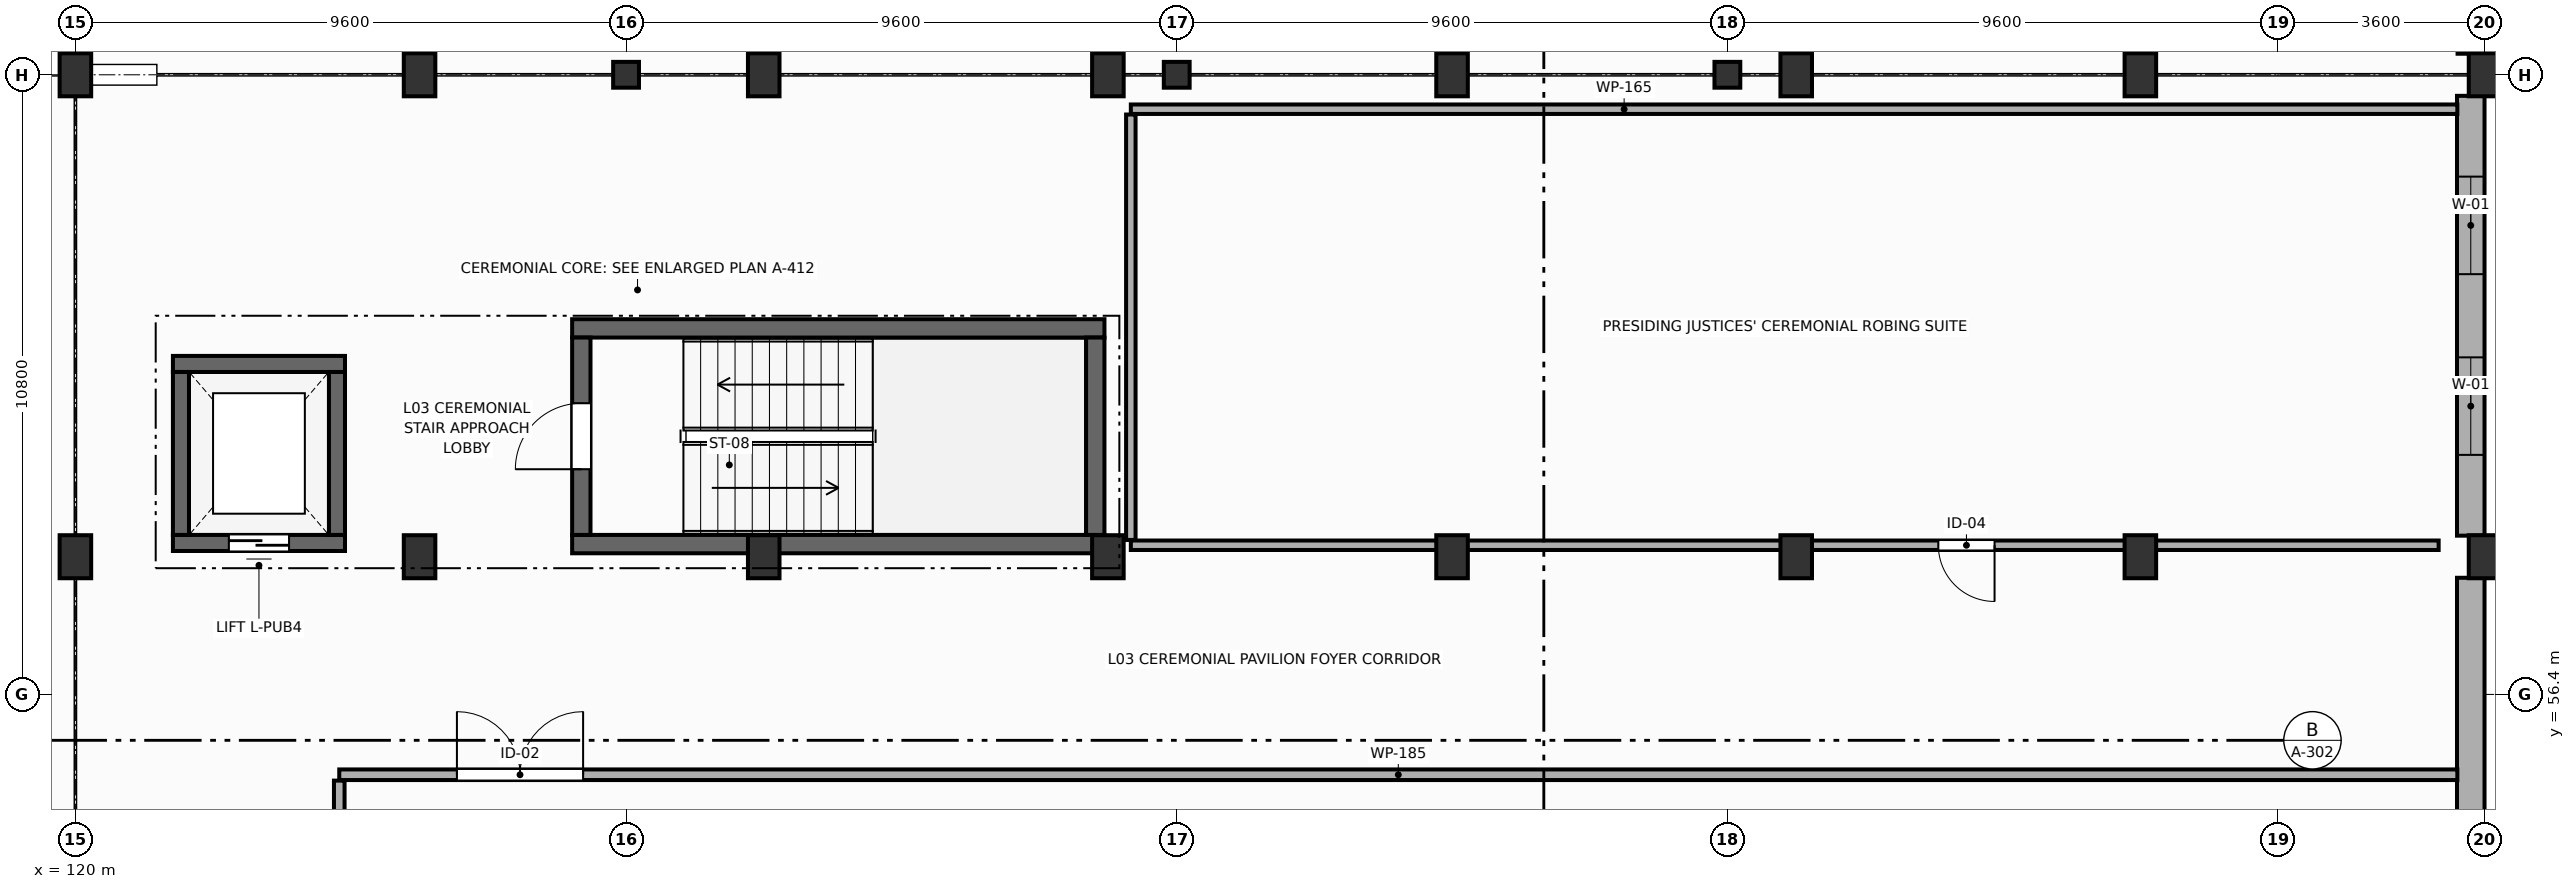
"""IFC4 building model, lengths in metres.
Left out: names, types, materials, properties, quantities, classifications, styles, units other than length and angle.
Written with IfcOpenShell. Run it as: python <this file> out.ifc"""

import sys

from ifc_helpers import new_model, si_unit, direction, frame, frame_2d, origin, origin_2d, place, context, subcontext, project, spatial, rectangle, extrude, element, fill, save


model = new_model("IFC4")
c1 = context("Model", 3, precision=1e-05, world=origin(), true_north=direction((0.0, 1.0)))
c2 = subcontext(c1, "Body", "Model", "MODEL_VIEW")
j1 = project(units=[si_unit("LENGTHUNIT", "METRE"), si_unit("PLANEANGLEUNIT", "RADIAN")], contexts=[c1])
p1 = place(None, origin())
s1 = spatial("IfcSite", under=j1, at=p1, CompositionType="ELEMENT")
p2 = place(p1, origin())
s2 = spatial("IfcBuilding", under=s1, at=p2, CompositionType="ELEMENT")
p3 = place(p2, frame((0.0, 0.0, 9.9)))
s3 = spatial("IfcBuildingStorey", under=s2, at=p3, CompositionType="ELEMENT", Elevation=9.9)
for number, where, z_axis, x_axis in (
    (1, (120.0, 58.8, 0.0), (0.0, 0.0, 1.0), (1.0, 0.0, 0.0)),
    (2, (120.0, 67.2, 0.0), (0.0, 0.0, 1.0), (1.0, 0.0, 0.0)),
    (3, (126.0, 58.8, 0.0), (0.0, 0.0, 1.0), (1.0, 0.0, 0.0)),
    (4, (126.0, 67.2, 0.0), (0.0, 0.0, 1.0), (1.0, 0.0, 0.0)),
    (5, (132.0, 58.8, 0.0), (0.0, 0.0, 1.0), (1.0, 0.0, 0.0)),
    (6, (132.0, 67.2, 0.0), (0.0, 0.0, 1.0), (1.0, 0.0, 0.0)),
    (7, (138.0, 58.8, 0.0), (0.0, 0.0, 1.0), (1.0, 0.0, 0.0)),
    (8, (138.0, 67.2, 0.0), (0.0, 0.0, 1.0), (1.0, 0.0, 0.0)),
    (9, (144.0, 58.8, 0.0), (0.0, 0.0, 1.0), (1.0, 0.0, 0.0)),
    (10, (144.0, 67.2, 0.0), (0.0, 0.0, 1.0), (1.0, 0.0, 0.0)),
    (11, (150.0, 58.8, 0.0), (0.0, 0.0, 1.0), (1.0, 0.0, 0.0)),
    (12, (150.0, 67.2, 0.0), (0.0, 0.0, 1.0), (1.0, 0.0, 0.0)),
    (13, (156.0, 58.8, 0.0), (0.0, 0.0, 1.0), (1.0, 0.0, 0.0)),
    (14, (156.0, 67.2, 0.0), (0.0, 0.0, 1.0), (1.0, 0.0, 0.0)),
    (15, (162.0, 58.8, 0.0), (0.0, 0.0, 1.0), (1.0, 0.0, 0.0)),
    (16, (162.0, 67.2, 0.0), (0.0, 0.0, 1.0), (1.0, 0.0, 0.0)),
):
    element("IfcColumn", number, at=place(p3, frame(where, z_axis=z_axis, x_axis=x_axis)), inside=s3, PredefinedType="COLUMN", context=c2, shape_type="SweptSolid", body=[
        extrude(rectangle(XDim=0.55, YDim=0.75, at=origin_2d()), origin(), (0.0, 0.0, 1.0), 4.5),
    ])
for number, where, z_axis, x_axis in (
    (17, (129.6, 67.2, 0.0), (0.0, 0.0, 1.0), (1.0, 0.0, 0.0)),
    (18, (139.2, 67.2, 0.0), (0.0, 0.0, 1.0), (1.0, 0.0, 0.0)),
    (19, (148.8, 67.2, 0.0), (0.0, 0.0, 1.0), (1.0, 0.0, 0.0)),
):
    element("IfcColumn", number, at=place(p3, frame(where, z_axis=z_axis, x_axis=x_axis)), inside=s3, PredefinedType="COLUMN", context=c2, shape_type="SweptSolid", body=[
        extrude(rectangle(XDim=0.45, YDim=0.45, at=origin_2d()), origin(), (0.0, 0.0, 1.0), 4.5),
    ])
p4 = place(p3, frame((161.76, 58.433, 0.0), z_axis=(0.0, 0.0, 1.0), x_axis=(0.0, -1.0, 0.0)))
e20 = element("IfcWall", 20, at=p4, inside=s3, PredefinedType="STANDARD", context=c2, shape_type="SweptSolid", body=[
    extrude(rectangle(XDim=20.866, YDim=0.48, at=frame_2d((10.433, 0.0))), origin(), (0.0, 0.0, 1.0), 4.24),
])
p5 = place(p4, frame((9.583, 0.0, 0.85)))
e21 = element("IfcOpeningElement", 21, at=p5, cuts=e20, PredefinedType="OPENING", context=c2, shape_type="SweptSolid", body=[
    extrude(rectangle(XDim=1.7, YDim=2.3, at=frame_2d((0.85, 1.15))), frame((0.0, 0.25, 0.0), z_axis=(0.0, -1.0, 0.0), x_axis=(1.0, 0.0, 0.0)), (0.0, 0.0, 1.0), 0.5),
])
p6 = place(p4, frame((16.083, 0.0, 0.85)))
e22 = element("IfcOpeningElement", 22, at=p6, cuts=e20, PredefinedType="OPENING", context=c2, shape_type="SweptSolid", body=[
    extrude(rectangle(XDim=1.7, YDim=2.3, at=frame_2d((0.85, 1.15))), frame((0.0, 0.25, 0.0), z_axis=(0.0, -1.0, 0.0), x_axis=(1.0, 0.0, 0.0)), (0.0, 0.0, 1.0), 0.5),
])
p7 = place(p3, frame((161.76, 66.833, 0.0), z_axis=(0.0, 0.0, 1.0), x_axis=(0.0, -1.0, 0.0)))
e23 = element("IfcWall", 23, at=p7, inside=s3, PredefinedType="STANDARD", context=c2, shape_type="SweptSolid", body=[
    extrude(rectangle(XDim=7.666, YDim=0.48, at=frame_2d((3.833, 0.0))), origin(), (0.0, 0.0, 1.0), 3.73),
])
p8 = place(p7, frame((1.408, 0.0, 0.85)))
e24 = element("IfcOpeningElement", 24, at=p8, cuts=e23, PredefinedType="OPENING", context=c2, shape_type="SweptSolid", body=[
    extrude(rectangle(XDim=1.7, YDim=2.3, at=frame_2d((0.85, 1.15))), frame((0.0, 0.25, 0.0), z_axis=(0.0, -1.0, 0.0), x_axis=(1.0, 0.0, 0.0)), (0.0, 0.0, 1.0), 0.5),
])
p9 = place(p7, frame((4.558, 0.0, 0.85)))
e25 = element("IfcOpeningElement", 25, at=p9, cuts=e23, PredefinedType="OPENING", context=c2, shape_type="SweptSolid", body=[
    extrude(rectangle(XDim=1.7, YDim=2.3, at=frame_2d((0.85, 1.15))), frame((0.0, 0.25, 0.0), z_axis=(0.0, -1.0, 0.0), x_axis=(1.0, 0.0, 0.0)), (0.0, 0.0, 1.0), 0.5),
])
p10 = place(p3, frame((161.76, 74.188, 0.0), z_axis=(0.0, 0.0, 1.0), x_axis=(0.0, -1.0, 0.0)))
e26 = element("IfcWall", 26, at=p10, inside=s3, PredefinedType="STANDARD", context=c2, shape_type="SweptSolid", body=[
    extrude(rectangle(XDim=6.621, YDim=0.46, at=frame_2d((3.311, 0.0))), origin(), (0.0, 0.0, 1.0), 3.38),
])
p11 = place(p10, frame((1.678, 0.0, 2.15)))
e27 = element("IfcOpeningElement", 27, at=p11, cuts=e26, PredefinedType="OPENING", context=c2, shape_type="SweptSolid", body=[
    extrude(rectangle(XDim=0.85, YDim=0.9, at=frame_2d((0.425, 0.45))), frame((0.0, 0.24, 0.0), z_axis=(0.0, -1.0, 0.0), x_axis=(1.0, 0.0, 0.0)), (0.0, 0.0, 1.0), 0.48),
])
p12 = place(p10, frame((4.248, 0.0, 2.15)))
e28 = element("IfcOpeningElement", 28, at=p12, cuts=e26, PredefinedType="OPENING", context=c2, shape_type="SweptSolid", body=[
    extrude(rectangle(XDim=0.85, YDim=0.9, at=frame_2d((0.425, 0.45))), frame((0.0, 0.24, 0.0), z_axis=(0.0, -1.0, 0.0), x_axis=(1.0, 0.0, 0.0)), (0.0, 0.0, 1.0), 0.48),
])
for number, where, z_axis, x_axis in (
    (29, (128.66, 62.78, 0.0), (0.0, 0.0, 1.0), (1.0, 0.0, 0.0)),
    (30, (137.94, 59.02, 0.0), (0.0, 0.0, 1.0), (-1.0, 0.0, 0.0)),
):
    element("IfcWall", number, at=place(p3, frame(where, z_axis=z_axis, x_axis=x_axis)), inside=s3, PredefinedType="SHEAR", context=c2, shape_type="SweptSolid", body=[
        extrude(rectangle(XDim=9.28, YDim=0.32, at=frame_2d((4.64, 0.0))), origin(), (0.0, 0.0, 1.0), 4.25),
    ])
p13 = place(p3, frame((128.82, 59.18, 0.0), z_axis=(0.0, 0.0, 1.0), x_axis=(0.0, 1.0, 0.0)))
e31 = element("IfcWall", 31, at=p13, inside=s3, PredefinedType="SHEAR", context=c2, shape_type="SweptSolid", body=[
    extrude(rectangle(XDim=3.44, YDim=0.32, at=frame_2d((1.72, 0.0))), origin(), (0.0, 0.0, 1.0), 4.25),
])
p14 = place(p13, frame((1.145, 0.0, 0.0)))
e32 = element("IfcOpeningElement", 32, at=p14, cuts=e31, PredefinedType="OPENING", context=c2, shape_type="SweptSolid", body=[
    extrude(rectangle(XDim=1.15, YDim=2.2, at=frame_2d((0.575, 1.1))), frame((0.0, 0.17, 0.0), z_axis=(0.0, -1.0, 0.0), x_axis=(1.0, 0.0, 0.0)), (0.0, 0.0, 1.0), 0.34),
])
p15 = place(p3, frame((137.78, 62.62, 0.0), z_axis=(0.0, 0.0, 1.0), x_axis=(0.0, -1.0, 0.0)))
e33 = element("IfcWall", 33, at=p15, inside=s3, PredefinedType="SHEAR", context=c2, shape_type="SweptSolid", body=[
    extrude(rectangle(XDim=3.44, YDim=0.32, at=frame_2d((1.72, 0.0))), origin(), (0.0, 0.0, 1.0), 4.25),
])
p16 = place(p3, frame((121.7, 62.16, 0.0), z_axis=(0.0, 0.0, 1.0), x_axis=(1.0, 0.0, 0.0)))
e34 = element("IfcWall", 34, at=p16, inside=s3, PredefinedType="SHEAR", context=c2, shape_type="SweptSolid", body=[
    extrude(rectangle(XDim=3.0, YDim=0.28, at=frame_2d((1.5, 0.0))), origin(), (0.0, 0.0, 1.0), 4.25),
])
p17 = place(p3, frame((124.7, 59.04, 0.0), z_axis=(0.0, 0.0, 1.0), x_axis=(-1.0, 0.0, 0.0)))
e35 = element("IfcWall", 35, at=p17, inside=s3, PredefinedType="SHEAR", context=c2, shape_type="SweptSolid", body=[
    extrude(rectangle(XDim=3.0, YDim=0.28, at=frame_2d((1.5, 0.0))), origin(), (0.0, 0.0, 1.0), 4.25),
])
p18 = place(p17, frame((0.975, 0.0, 0.0)))
e36 = element("IfcOpeningElement", 36, at=p18, cuts=e35, PredefinedType="OPENING", context=c2, shape_type="SweptSolid", body=[
    extrude(rectangle(XDim=1.05, YDim=2.2, at=frame_2d((0.525, 1.1))), frame((0.0, 0.15, 0.0), z_axis=(0.0, -1.0, 0.0), x_axis=(1.0, 0.0, 0.0)), (0.0, 0.0, 1.0), 0.3),
])
for number, where, z_axis, x_axis in (
    (37, (121.84, 59.18, 0.0), (0.0, 0.0, 1.0), (0.0, 1.0, 0.0)),
    (38, (124.56, 62.02, 0.0), (0.0, 0.0, 1.0), (0.0, -1.0, 0.0)),
):
    element("IfcWall", number, at=place(p3, frame(where, z_axis=z_axis, x_axis=x_axis)), inside=s3, PredefinedType="SHEAR", context=c2, shape_type="SweptSolid", body=[
        extrude(rectangle(XDim=2.84, YDim=0.28, at=frame_2d((1.42, 0.0))), origin(), (0.0, 0.0, 1.0), 4.25),
    ])
p19 = place(p3, frame((124.6, 55.0, 0.0), z_axis=(0.0, 0.0, 1.0), x_axis=(1.0, 0.0, 0.0)))
e39 = element("IfcWall", 39, at=p19, inside=s3, PredefinedType="PARTITIONING", context=c2, shape_type="SweptSolid", body=[
    extrude(rectangle(XDim=36.926, YDim=0.185, at=frame_2d((18.463, 0.0))), origin(), (0.0, 0.0, 1.0), 4.235),
])
p20 = place(p19, frame((2.051, 0.0, 0.0)))
e40 = element("IfcOpeningElement", 40, at=p20, cuts=e39, PredefinedType="OPENING", context=c2, shape_type="SweptSolid", body=[
    extrude(rectangle(XDim=2.2, YDim=2.7, at=frame_2d((1.1, 1.35))), frame((0.0, 0.103, 0.0), z_axis=(0.0, -1.0, 0.0), x_axis=(1.0, 0.0, 0.0)), (0.0, 0.0, 1.0), 0.205),
])
p21 = place(p3, frame((124.6, 38.103, 0.0), z_axis=(0.0, 0.0, 1.0), x_axis=(0.0, 1.0, 0.0)))
e41 = element("IfcWall", 41, at=p21, inside=s3, PredefinedType="PARTITIONING", context=c2, shape_type="SweptSolid", body=[
    extrude(rectangle(XDim=16.795, YDim=0.185, at=frame_2d((8.397, 0.0))), origin(), (0.0, 0.0, 1.0), 4.235),
])
p22 = place(p3, frame((138.4, 66.6, 0.0), z_axis=(0.0, 0.0, 1.0), x_axis=(1.0, 0.0, 0.0)))
e42 = element("IfcWall", 42, at=p22, inside=s3, PredefinedType="PARTITIONING", context=c2, shape_type="SweptSolid", body=[
    extrude(rectangle(XDim=23.126, YDim=0.165, at=frame_2d((11.563, 0.0))), origin(), (0.0, 0.0, 1.0), 3.73),
])
p23 = place(p3, frame((161.2, 59.0, 0.0), z_axis=(0.0, 0.0, 1.0), x_axis=(-1.0, 0.0, 0.0)))
e43 = element("IfcWall", 43, at=p23, inside=s3, PredefinedType="PARTITIONING", context=c2, shape_type="SweptSolid", body=[
    extrude(rectangle(XDim=22.8, YDim=0.165, at=frame_2d((11.4, 0.0))), origin(), (0.0, 0.0, 1.0), 3.68),
])
p24 = place(p23, frame((7.742, 0.0, 0.0)))
e44 = element("IfcOpeningElement", 44, at=p24, cuts=e43, PredefinedType="OPENING", context=c2, shape_type="SweptSolid", body=[
    extrude(rectangle(XDim=0.98, YDim=2.2, at=frame_2d((0.49, 1.1))), frame((0.0, 0.093, 0.0), z_axis=(0.0, -1.0, 0.0), x_axis=(1.0, 0.0, 0.0)), (0.0, 0.0, 1.0), 0.185),
])
p25 = place(p3, frame((138.4, 59.093, 0.0), z_axis=(0.0, 0.0, 1.0), x_axis=(0.0, 1.0, 0.0)))
e45 = element("IfcWall", 45, at=p25, inside=s3, PredefinedType="PARTITIONING", context=c2, shape_type="SweptSolid", body=[
    extrude(rectangle(XDim=7.415, YDim=0.165, at=frame_2d((3.708, 0.0))), origin(), (0.0, 0.0, 1.0), 3.68),
])
p26 = place(p8, origin())
e46 = element("IfcWindow", 46, at=p26, inside=s3, PartitioningType="SINGLE_PANEL", PredefinedType="WINDOW", context=c2, shape_type="SweptSolid", body=[
    extrude(rectangle(XDim=1.7, YDim=2.3, at=frame_2d((0.85, 1.15))), frame((0.0, 0.03, 0.0), z_axis=(0.0, -1.0, 0.0), x_axis=(1.0, 0.0, 0.0)), (0.0, 0.0, 1.0), 0.06),
])
fill(e24, e46)
p27 = place(p9, origin())
e47 = element("IfcWindow", 47, at=p27, inside=s3, PartitioningType="SINGLE_PANEL", PredefinedType="WINDOW", context=c2, shape_type="SweptSolid", body=[
    extrude(rectangle(XDim=1.7, YDim=2.3, at=frame_2d((0.85, 1.15))), frame((0.0, 0.03, 0.0), z_axis=(0.0, -1.0, 0.0), x_axis=(1.0, 0.0, 0.0)), (0.0, 0.0, 1.0), 0.06),
])
fill(e25, e47)
p28 = place(p14, origin())
e48 = element("IfcDoor", 48, at=p28, inside=s3, OperationType="SINGLE_SWING_LEFT", PredefinedType="DOOR", context=c2, shape_type="SweptSolid", body=[
    extrude(rectangle(XDim=1.15, YDim=2.2, at=frame_2d((0.575, 1.1))), frame((0.0, 0.025, 0.0), z_axis=(0.0, -1.0, 0.0), x_axis=(1.0, 0.0, 0.0)), (0.0, 0.0, 1.0), 0.05),
])
fill(e32, e48)
p29 = place(p18, origin())
e49 = element("IfcDoor", 49, at=p29, inside=s3, OperationType="DOUBLE_DOOR_SLIDING", PredefinedType="DOOR", context=c2, shape_type="SweptSolid", body=[
    extrude(rectangle(XDim=1.05, YDim=2.2, at=frame_2d((0.525, 1.1))), frame((0.0, 0.025, 0.0), z_axis=(0.0, -1.0, 0.0), x_axis=(1.0, 0.0, 0.0)), (0.0, 0.0, 1.0), 0.05),
])
fill(e36, e49)
p30 = place(p20, origin())
e50 = element("IfcDoor", 50, at=p30, inside=s3, OperationType="DOUBLE_DOOR_SINGLE_SWING", PredefinedType="DOOR", context=c2, shape_type="SweptSolid", body=[
    extrude(rectangle(XDim=2.2, YDim=2.7, at=frame_2d((1.1, 1.35))), frame((0.0, 0.025, 0.0), z_axis=(0.0, -1.0, 0.0), x_axis=(1.0, 0.0, 0.0)), (0.0, 0.0, 1.0), 0.05),
])
fill(e40, e50)
p31 = place(p24, origin())
e51 = element("IfcDoor", 51, at=p31, inside=s3, OperationType="SINGLE_SWING_LEFT", PredefinedType="DOOR", context=c2, shape_type="SweptSolid", body=[
    extrude(rectangle(XDim=0.98, YDim=2.2, at=frame_2d((0.49, 1.1))), frame((0.0, 0.025, 0.0), z_axis=(0.0, -1.0, 0.0), x_axis=(1.0, 0.0, 0.0)), (0.0, 0.0, 1.0), 0.05),
])
fill(e44, e51)
save(model, sys.argv[1])
